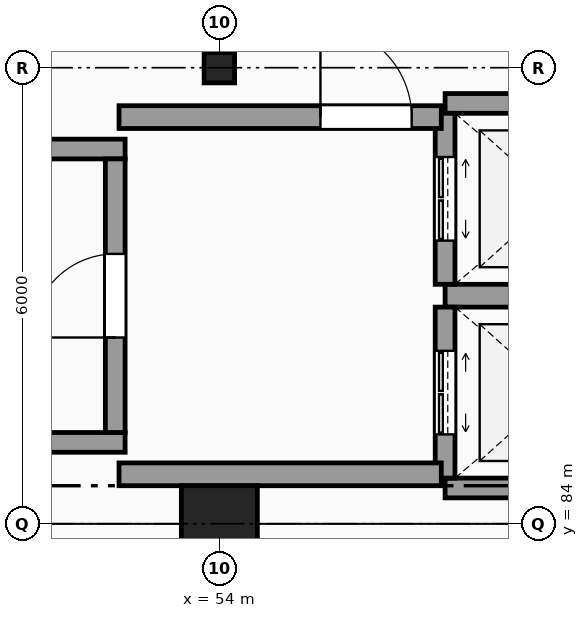
"""IFC4 building model, lengths in metres.
Left out: names, types, materials, properties, quantities, classifications, styles, units other than length and angle.
Written with IfcOpenShell. Run it as: python <this file> out.ifc"""

import sys

from ifc_helpers import new_model, si_unit, direction, frame, frame_2d, origin, origin_2d, place, context, subcontext, project, spatial, rectangle, i_section, extrude, element, fill, save


model = new_model("IFC4")
c1 = context("Model", 3, precision=1e-05, world=origin(), true_north=direction((0.0, 1.0)))
c2 = subcontext(c1, "Body", "Model", "MODEL_VIEW")
j1 = project(units=[si_unit("LENGTHUNIT", "METRE"), si_unit("PLANEANGLEUNIT", "RADIAN")], contexts=[c1])
p1 = place(None, origin())
s1 = spatial("IfcSite", under=j1, at=p1, CompositionType="ELEMENT")
p2 = place(p1, origin())
s2 = spatial("IfcBuilding", under=s1, at=p2, CompositionType="ELEMENT")
p3 = place(p2, origin())
s3 = spatial("IfcBuildingStorey", under=s2, at=p3, CompositionType="ELEMENT", Elevation=0.0)
p4 = place(p3, frame((54.0, 84.0, 0.0), z_axis=(0.0, 0.0, 1.0), x_axis=(1.0, 0.0, 0.0)))
e1 = element("IfcColumn", 1, at=p4, inside=s3, PredefinedType="COLUMN", context=c2, shape_type="SweptSolid", body=[
    extrude(rectangle(XDim=1.0, YDim=1.0, at=origin_2d()), origin(), (0.0, 0.0, 1.0), 6.0),
])
p5 = place(p3, frame((54.0, 90.0, 0.0), z_axis=(0.0, 0.0, 1.0), x_axis=(1.0, 0.0, 0.0)))
e2 = element("IfcColumn", 2, at=p5, inside=s3, PredefinedType="COLUMN", context=c2, shape_type="SweptSolid", body=[
    extrude(i_section(OverallWidth=0.401, OverallDepth=0.399, WebThickness=0.019, FlangeThickness=0.03, FilletRadius=0.015, at=origin_2d()), origin(), (0.0, 0.0, 1.0), 6.0),
])
for number, where, z_axis, x_axis in (
    (3, (42.04, 85.07, 0.0), (0.0, 0.0, 1.0), (1.0, 0.0, 0.0)),
    (4, (42.04, 88.93, 0.0), (0.0, 0.0, 1.0), (1.0, 0.0, 0.0)),
):
    element("IfcWall", number, at=place(p3, frame(where, z_axis=z_axis, x_axis=x_axis)), inside=s3, PredefinedType="SHEAR", context=c2, shape_type="SweptSolid", body=[
        extrude(rectangle(XDim=10.72, YDim=0.26, at=frame_2d((5.36, 0.0))), origin(), (0.0, 0.0, 1.0), 6.0),
    ])
p6 = place(p3, frame((52.63, 85.2, 0.0), z_axis=(0.0, 0.0, 1.0), x_axis=(0.0, 1.0, 0.0)))
e5 = element("IfcWall", 5, at=p6, inside=s3, PredefinedType="SHEAR", context=c2, shape_type="SweptSolid", body=[
    extrude(rectangle(XDim=3.6, YDim=0.26, at=frame_2d((1.8, 0.0))), origin(), (0.0, 0.0, 1.0), 6.0),
])
p7 = place(p6, frame((1.25, 0.0, 0.0)))
e6 = element("IfcOpeningElement", 6, at=p7, cuts=e5, PredefinedType="OPENING", context=c2, shape_type="SweptSolid", body=[
    extrude(rectangle(XDim=1.1, YDim=2.15, at=frame_2d((0.55, 1.075))), frame((0.0, 0.14, 0.0), z_axis=(0.0, -1.0, 0.0), x_axis=(1.0, 0.0, 0.0)), (0.0, 0.0, 1.0), 0.28),
])
p8 = place(p3, frame((56.97, 84.47, 0.0), z_axis=(0.0, 0.0, 1.0), x_axis=(1.0, 0.0, 0.0)))
e7 = element("IfcWall", 7, at=p8, inside=s3, PredefinedType="SHEAR", context=c2, shape_type="SweptSolid", body=[
    extrude(rectangle(XDim=2.91, YDim=0.26, at=frame_2d((1.455, 0.0))), origin(), (0.0, 0.0, 1.0), 6.0),
])
p9 = place(p3, frame((56.97, 87.0, 0.0), z_axis=(0.0, 0.0, 1.0), x_axis=(1.0, 0.0, 0.0)))
e8 = element("IfcWall", 8, at=p9, inside=s3, PredefinedType="SHEAR", context=c2, shape_type="SweptSolid", body=[
    extrude(rectangle(XDim=2.91, YDim=0.3, at=frame_2d((1.455, 0.0))), origin(), (0.0, 0.0, 1.0), 6.0),
])
p10 = place(p3, frame((56.97, 84.6, 0.0), z_axis=(0.0, 0.0, 1.0), x_axis=(0.0, 1.0, 0.0)))
e9 = element("IfcWall", 9, at=p10, inside=s3, PredefinedType="SHEAR", context=c2, shape_type="SweptSolid", body=[
    extrude(rectangle(XDim=2.25, YDim=0.26, at=frame_2d((1.125, 0.0))), origin(), (0.0, 0.0, 1.0), 6.0),
])
p11 = place(p10, frame((0.575, 0.0, 0.0)))
e10 = element("IfcOpeningElement", 10, at=p11, cuts=e9, PredefinedType="OPENING", context=c2, shape_type="SweptSolid", body=[
    extrude(rectangle(XDim=1.1, YDim=2.2, at=frame_2d((0.55, 1.1))), frame((0.0, 0.14, 0.0), z_axis=(0.0, -1.0, 0.0), x_axis=(1.0, 0.0, 0.0)), (0.0, 0.0, 1.0), 0.28),
])
p12 = place(p3, frame((56.97, 89.53, 0.0), z_axis=(0.0, 0.0, 1.0), x_axis=(1.0, 0.0, 0.0)))
e11 = element("IfcWall", 11, at=p12, inside=s3, PredefinedType="SHEAR", context=c2, shape_type="SweptSolid", body=[
    extrude(rectangle(XDim=2.91, YDim=0.26, at=frame_2d((1.455, 0.0))), origin(), (0.0, 0.0, 1.0), 6.0),
])
p13 = place(p3, frame((56.97, 87.15, 0.0), z_axis=(0.0, 0.0, 1.0), x_axis=(0.0, 1.0, 0.0)))
e12 = element("IfcWall", 12, at=p13, inside=s3, PredefinedType="SHEAR", context=c2, shape_type="SweptSolid", body=[
    extrude(rectangle(XDim=2.25, YDim=0.26, at=frame_2d((1.125, 0.0))), origin(), (0.0, 0.0, 1.0), 6.0),
])
p14 = place(p13, frame((0.575, 0.0, 0.0)))
e13 = element("IfcOpeningElement", 13, at=p14, cuts=e12, PredefinedType="OPENING", context=c2, shape_type="SweptSolid", body=[
    extrude(rectangle(XDim=1.1, YDim=2.2, at=frame_2d((0.55, 1.1))), frame((0.0, 0.14, 0.0), z_axis=(0.0, -1.0, 0.0), x_axis=(1.0, 0.0, 0.0)), (0.0, 0.0, 1.0), 0.28),
])
p15 = place(p3, frame((52.68, 89.35, 0.0), z_axis=(0.0, 0.0, 1.0), x_axis=(1.0, 0.0, 0.0)))
e14 = element("IfcWall", 14, at=p15, inside=s3, PredefinedType="SHEAR", context=c2, shape_type="SweptSolid", body=[
    extrude(rectangle(XDim=4.24, YDim=0.3, at=frame_2d((2.12, 0.0))), origin(), (0.0, 0.0, 1.0), 6.0),
])
p16 = place(p15, frame((2.65, 0.0, 0.0)))
e15 = element("IfcOpeningElement", 15, at=p16, cuts=e14, PredefinedType="OPENING", context=c2, shape_type="SweptSolid", body=[
    extrude(rectangle(XDim=1.2, YDim=2.2, at=frame_2d((0.6, 1.1))), frame((0.0, 0.16, 0.0), z_axis=(0.0, -1.0, 0.0), x_axis=(1.0, 0.0, 0.0)), (0.0, 0.0, 1.0), 0.32),
])
p17 = place(p3, frame((52.68, 84.65, 0.0), z_axis=(0.0, 0.0, 1.0), x_axis=(1.0, 0.0, 0.0)))
e16 = element("IfcWall", 16, at=p17, inside=s3, PredefinedType="SHEAR", context=c2, shape_type="SweptSolid", body=[
    extrude(rectangle(XDim=4.24, YDim=0.3, at=frame_2d((2.12, 0.0))), origin(), (0.0, 0.0, 1.0), 6.0),
])
p18 = place(p7, origin())
e17 = element("IfcDoor", 17, at=p18, inside=s3, OperationType="SINGLE_SWING_LEFT", PredefinedType="DOOR", context=c2, shape_type="SweptSolid", body=[
    extrude(rectangle(XDim=1.1, YDim=2.15, at=frame_2d((0.55, 1.075))), frame((0.0, 0.025, 0.0), z_axis=(0.0, -1.0, 0.0), x_axis=(1.0, 0.0, 0.0)), (0.0, 0.0, 1.0), 0.05),
])
fill(e6, e17)
p19 = place(p11, origin())
e18 = element("IfcDoor", 18, at=p19, inside=s3, OperationType="DOUBLE_DOOR_SLIDING", PredefinedType="DOOR", context=c2, shape_type="SweptSolid", body=[
    extrude(rectangle(XDim=1.1, YDim=2.2, at=frame_2d((0.55, 1.1))), frame((0.0, 0.025, 0.0), z_axis=(0.0, -1.0, 0.0), x_axis=(1.0, 0.0, 0.0)), (0.0, 0.0, 1.0), 0.05),
])
fill(e10, e18)
p20 = place(p14, origin())
e19 = element("IfcDoor", 19, at=p20, inside=s3, OperationType="DOUBLE_DOOR_SLIDING", PredefinedType="DOOR", context=c2, shape_type="SweptSolid", body=[
    extrude(rectangle(XDim=1.1, YDim=2.2, at=frame_2d((0.55, 1.1))), frame((0.0, 0.025, 0.0), z_axis=(0.0, -1.0, 0.0), x_axis=(1.0, 0.0, 0.0)), (0.0, 0.0, 1.0), 0.05),
])
fill(e13, e19)
p21 = place(p16, origin())
e20 = element("IfcDoor", 20, at=p21, inside=s3, OperationType="SINGLE_SWING_LEFT", PredefinedType="DOOR", context=c2, shape_type="SweptSolid", body=[
    extrude(rectangle(XDim=1.2, YDim=2.2, at=frame_2d((0.6, 1.1))), frame((0.0, 0.025, 0.0), z_axis=(0.0, -1.0, 0.0), x_axis=(1.0, 0.0, 0.0)), (0.0, 0.0, 1.0), 0.05),
])
fill(e15, e20)
save(model, sys.argv[1])
